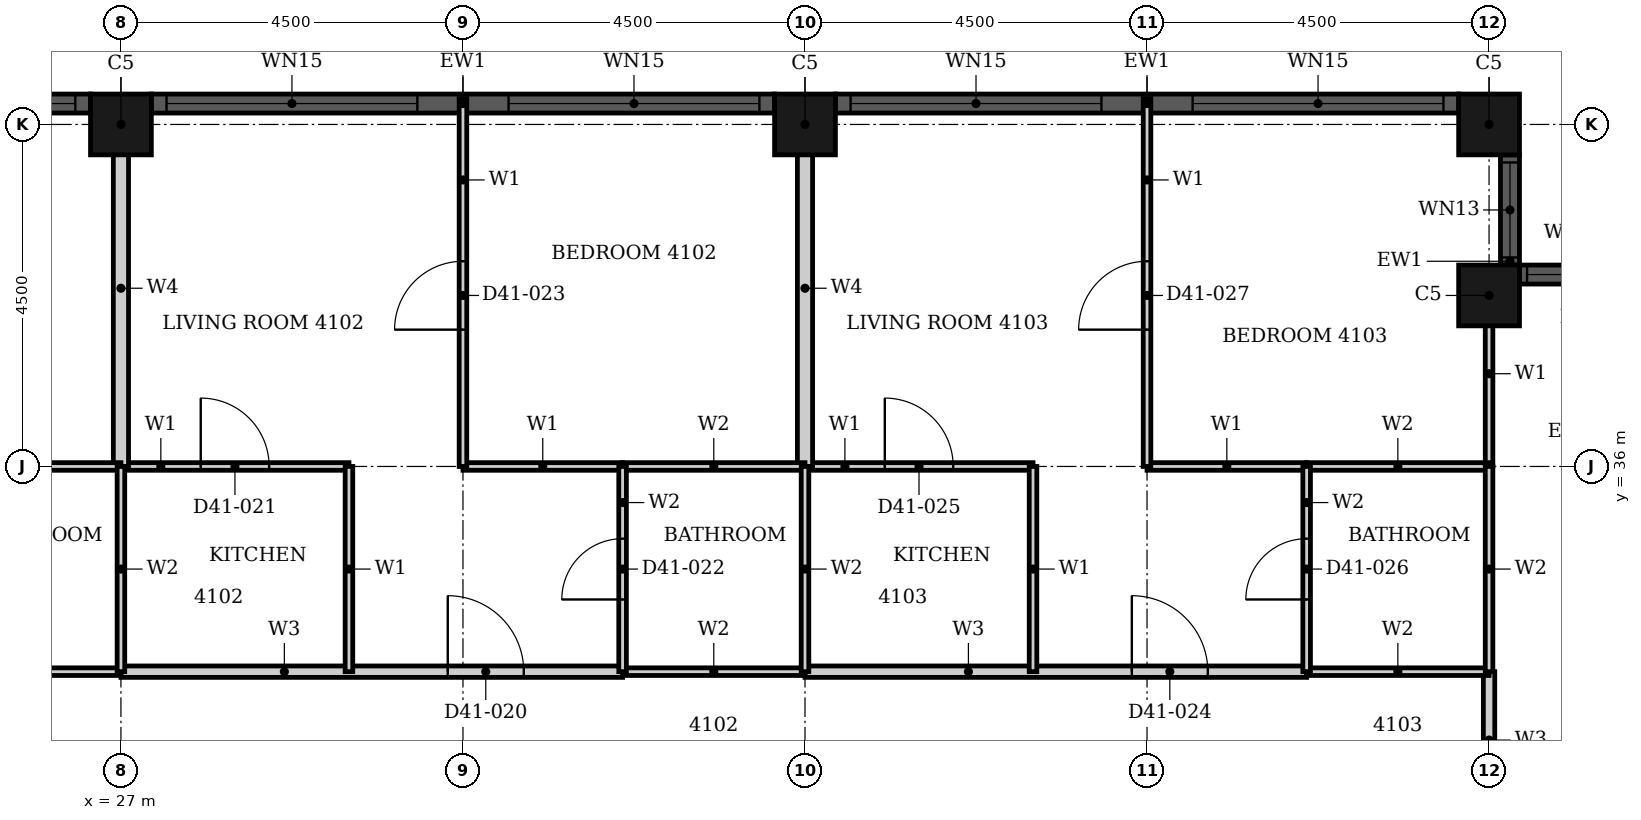
"""IFC4 building model, lengths in metres.
Left out: names, types, materials, properties, quantities, classifications, styles, units other than length and angle.
Written with IfcOpenShell. Run it as: python <this file> out.ifc"""

import sys

from ifc_helpers import new_model, si_unit, direction, frame, frame_2d, origin, origin_2d, place, context, subcontext, project, spatial, rectangle, hollow_rectangle, extrude, element, fill, save


model = new_model("IFC4")
c1 = context("Model", 3, precision=1e-05, world=origin(), true_north=direction((0.0, 1.0)))
c2 = subcontext(c1, "Body", "Model", "MODEL_VIEW")
j1 = project(units=[si_unit("LENGTHUNIT", "METRE"), si_unit("PLANEANGLEUNIT", "RADIAN")], contexts=[c1])
p1 = place(None, origin())
s1 = spatial("IfcSite", under=j1, at=p1, CompositionType="ELEMENT")
p2 = place(p1, origin())
s2 = spatial("IfcBuilding", under=s1, at=p2, CompositionType="ELEMENT")
p3 = place(p2, frame((0.0, 0.0, 165.4)))
s3 = spatial("IfcBuildingStorey", under=s2, at=p3, CompositionType="ELEMENT", Elevation=165.4)
for number, where, z_axis, x_axis in (
    (1, (45.0, 38.25, 0.0), (0.0, 0.0, 1.0), (1.0, 0.0, 0.0)),
    (2, (45.0, 40.5, 0.0), (0.0, 0.0, 1.0), (1.0, 0.0, 0.0)),
    (3, (36.0, 40.5, 0.0), (0.0, 0.0, 1.0), (1.0, 0.0, 0.0)),
    (4, (27.0, 40.5, 0.0), (0.0, 0.0, 1.0), (1.0, 0.0, 0.0)),
):
    element("IfcColumn", number, at=place(p3, frame(where, z_axis=z_axis, x_axis=x_axis)), inside=s3, PredefinedType="COLUMN", context=c2, shape_type="SweptSolid", body=[
        extrude(hollow_rectangle(XDim=0.8, YDim=0.8, WallThickness=0.025, at=origin_2d()), origin(), (0.0, 0.0, 1.0), 3.7),
    ])
p4 = place(p3, frame((46.85, 38.525, 0.0), z_axis=(0.0, 0.0, 1.0), x_axis=(-1.0, 0.0, 0.0)))
e5 = element("IfcWall", 5, at=p4, inside=s3, PredefinedType="SOLIDWALL", context=c2, shape_type="SweptSolid", body=[
    extrude(rectangle(XDim=1.45, YDim=0.25, at=frame_2d((0.725, 0.0))), origin(), (0.0, 0.0, 1.0), 3.7),
])
p5 = place(p4, frame((0.1, 0.0, 0.9)))
e6 = element("IfcOpeningElement", 6, at=p5, cuts=e5, PredefinedType="OPENING", context=c2, shape_type="SweptSolid", body=[
    extrude(rectangle(XDim=1.25, YDim=1.85, at=frame_2d((0.625, 0.925))), frame((0.0, 0.135, 0.0), z_axis=(0.0, -1.0, 0.0), x_axis=(1.0, 0.0, 0.0)), (0.0, 0.0, 1.0), 0.27),
])
p6 = place(p3, frame((45.275, 38.65, 0.0), z_axis=(0.0, 0.0, 1.0), x_axis=(0.0, 1.0, 0.0)))
e7 = element("IfcWall", 7, at=p6, inside=s3, PredefinedType="SOLIDWALL", context=c2, shape_type="SweptSolid", body=[
    extrude(rectangle(XDim=1.45, YDim=0.25, at=frame_2d((0.725, 0.0))), origin(), (0.0, 0.0, 1.0), 3.7),
])
p7 = place(p6, frame((0.1, 0.0, 0.9)))
e8 = element("IfcOpeningElement", 8, at=p7, cuts=e7, PredefinedType="OPENING", context=c2, shape_type="SweptSolid", body=[
    extrude(rectangle(XDim=1.25, YDim=1.85, at=frame_2d((0.625, 0.925))), frame((0.0, 0.135, 0.0), z_axis=(0.0, -1.0, 0.0), x_axis=(1.0, 0.0, 0.0)), (0.0, 0.0, 1.0), 0.27),
])
p8 = place(p3, frame((44.6, 40.775, 0.0), z_axis=(0.0, 0.0, 1.0), x_axis=(-1.0, 0.0, 0.0)))
e9 = element("IfcWall", 9, at=p8, inside=s3, PredefinedType="SOLIDWALL", context=c2, shape_type="SweptSolid", body=[
    extrude(rectangle(XDim=8.2, YDim=0.25, at=frame_2d((4.1, 0.0))), origin(), (0.0, 0.0, 1.0), 3.7),
])
p9 = place(p8, frame((0.2, 0.0, 0.45)))
e10 = element("IfcOpeningElement", 10, at=p9, cuts=e9, PredefinedType="OPENING", context=c2, shape_type="SweptSolid", body=[
    extrude(rectangle(XDim=3.3, YDim=2.3, at=frame_2d((1.65, 1.15))), frame((0.0, 0.135, 0.0), z_axis=(0.0, -1.0, 0.0), x_axis=(1.0, 0.0, 0.0)), (0.0, 0.0, 1.0), 0.27),
])
p10 = place(p8, frame((4.7, 0.0, 0.45)))
e11 = element("IfcOpeningElement", 11, at=p10, cuts=e9, PredefinedType="OPENING", context=c2, shape_type="SweptSolid", body=[
    extrude(rectangle(XDim=3.3, YDim=2.3, at=frame_2d((1.65, 1.15))), frame((0.0, 0.135, 0.0), z_axis=(0.0, -1.0, 0.0), x_axis=(1.0, 0.0, 0.0)), (0.0, 0.0, 1.0), 0.27),
])
p11 = place(p3, frame((35.6, 40.775, 0.0), z_axis=(0.0, 0.0, 1.0), x_axis=(-1.0, 0.0, 0.0)))
e12 = element("IfcWall", 12, at=p11, inside=s3, PredefinedType="SOLIDWALL", context=c2, shape_type="SweptSolid", body=[
    extrude(rectangle(XDim=8.2, YDim=0.25, at=frame_2d((4.1, 0.0))), origin(), (0.0, 0.0, 1.0), 3.7),
])
p12 = place(p11, frame((0.2, 0.0, 0.45)))
e13 = element("IfcOpeningElement", 13, at=p12, cuts=e12, PredefinedType="OPENING", context=c2, shape_type="SweptSolid", body=[
    extrude(rectangle(XDim=3.3, YDim=2.3, at=frame_2d((1.65, 1.15))), frame((0.0, 0.135, 0.0), z_axis=(0.0, -1.0, 0.0), x_axis=(1.0, 0.0, 0.0)), (0.0, 0.0, 1.0), 0.27),
])
p13 = place(p11, frame((4.7, 0.0, 0.45)))
e14 = element("IfcOpeningElement", 14, at=p13, cuts=e12, PredefinedType="OPENING", context=c2, shape_type="SweptSolid", body=[
    extrude(rectangle(XDim=3.3, YDim=2.3, at=frame_2d((1.65, 1.15))), frame((0.0, 0.135, 0.0), z_axis=(0.0, -1.0, 0.0), x_axis=(1.0, 0.0, 0.0)), (0.0, 0.0, 1.0), 0.27),
])
p14 = place(p3, frame((26.6, 40.775, 0.0), z_axis=(0.0, 0.0, 1.0), x_axis=(-1.0, 0.0, 0.0)))
e15 = element("IfcWall", 15, at=p14, inside=s3, PredefinedType="SOLIDWALL", context=c2, shape_type="SweptSolid", body=[
    extrude(rectangle(XDim=8.2, YDim=0.25, at=frame_2d((4.1, 0.0))), origin(), (0.0, 0.0, 1.0), 3.7),
])
p15 = place(p14, frame((0.2, 0.0, 0.45)))
e16 = element("IfcOpeningElement", 16, at=p15, cuts=e15, PredefinedType="OPENING", context=c2, shape_type="SweptSolid", body=[
    extrude(rectangle(XDim=3.3, YDim=2.3, at=frame_2d((1.65, 1.15))), frame((0.0, 0.135, 0.0), z_axis=(0.0, -1.0, 0.0), x_axis=(1.0, 0.0, 0.0)), (0.0, 0.0, 1.0), 0.27),
])
p16 = place(p14, frame((4.7, 0.0, 0.45)))
e17 = element("IfcOpeningElement", 17, at=p16, cuts=e15, PredefinedType="OPENING", context=c2, shape_type="SweptSolid", body=[
    extrude(rectangle(XDim=3.3, YDim=2.3, at=frame_2d((1.65, 1.15))), frame((0.0, 0.135, 0.0), z_axis=(0.0, -1.0, 0.0), x_axis=(1.0, 0.0, 0.0)), (0.0, 0.0, 1.0), 0.27),
])
p17 = place(p3, frame((27.0, 33.3, 0.0), z_axis=(0.0, 0.0, 1.0), x_axis=(1.0, 0.0, 0.0)))
e18 = element("IfcWall", 18, at=p17, inside=s3, PredefinedType="PARTITIONING", context=c2, shape_type="SweptSolid", body=[
    extrude(rectangle(XDim=6.6, YDim=0.15, at=frame_2d((3.3, 0.0))), origin(), (0.0, 0.0, 1.0), 3.4),
])
p18 = place(p17, frame((4.3, 0.0, 0.0)))
e19 = element("IfcOpeningElement", 19, at=p18, cuts=e18, PredefinedType="OPENING", context=c2, shape_type="SweptSolid", body=[
    extrude(rectangle(XDim=1.0, YDim=2.2, at=frame_2d((0.5, 1.1))), frame((0.0, 0.085, 0.0), z_axis=(0.0, -1.0, 0.0), x_axis=(1.0, 0.0, 0.0)), (0.0, 0.0, 1.0), 0.17),
])
p19 = place(p3, frame((36.0, 33.3, 0.0), z_axis=(0.0, 0.0, 1.0), x_axis=(1.0, 0.0, 0.0)))
e20 = element("IfcWall", 20, at=p19, inside=s3, PredefinedType="PARTITIONING", context=c2, shape_type="SweptSolid", body=[
    extrude(rectangle(XDim=6.6, YDim=0.15, at=frame_2d((3.3, 0.0))), origin(), (0.0, 0.0, 1.0), 3.4),
])
p20 = place(p19, frame((4.3, 0.0, 0.0)))
e21 = element("IfcOpeningElement", 21, at=p20, cuts=e20, PredefinedType="OPENING", context=c2, shape_type="SweptSolid", body=[
    extrude(rectangle(XDim=1.0, YDim=2.2, at=frame_2d((0.5, 1.1))), frame((0.0, 0.085, 0.0), z_axis=(0.0, -1.0, 0.0), x_axis=(1.0, 0.0, 0.0)), (0.0, 0.0, 1.0), 0.17),
])
p21 = place(p3, frame((45.0, 31.5, 0.0), z_axis=(0.0, 0.0, 1.0), x_axis=(0.0, 1.0, 0.0)))
e22 = element("IfcWall", 22, at=p21, inside=s3, PredefinedType="PARTITIONING", context=c2, shape_type="SweptSolid", body=[
    extrude(rectangle(XDim=1.8, YDim=0.15, at=frame_2d((0.9, 0.0))), origin(), (0.0, 0.0, 1.0), 3.4),
])
p22 = place(p3, frame((31.5, 36.0, 0.0), z_axis=(0.0, 0.0, 1.0), x_axis=(1.0, 0.0, 0.0)))
e23 = element("IfcWall", 23, at=p22, inside=s3, PredefinedType="PARTITIONING", context=c2, shape_type="SweptSolid", body=[
    extrude(rectangle(XDim=2.1, YDim=0.1, at=frame_2d((1.05, 0.0))), origin(), (0.0, 0.0, 1.0), 3.4),
])
p23 = place(p3, frame((27.0, 36.0, 0.0), z_axis=(0.0, 0.0, 1.0), x_axis=(1.0, 0.0, 0.0)))
e24 = element("IfcWall", 24, at=p23, inside=s3, PredefinedType="PARTITIONING", context=c2, shape_type="SweptSolid", body=[
    extrude(rectangle(XDim=3.0, YDim=0.1, at=frame_2d((1.5, 0.0))), origin(), (0.0, 0.0, 1.0), 3.4),
])
p24 = place(p23, frame((1.05, 0.0, 0.0)))
e25 = element("IfcOpeningElement", 25, at=p24, cuts=e24, PredefinedType="OPENING", context=c2, shape_type="SweptSolid", body=[
    extrude(rectangle(XDim=0.9, YDim=2.1, at=frame_2d((0.45, 1.05))), frame((0.0, 0.06, 0.0), z_axis=(0.0, -1.0, 0.0), x_axis=(1.0, 0.0, 0.0)), (0.0, 0.0, 1.0), 0.12),
])
p25 = place(p3, frame((40.5, 36.0, 0.0), z_axis=(0.0, 0.0, 1.0), x_axis=(1.0, 0.0, 0.0)))
e26 = element("IfcWall", 26, at=p25, inside=s3, PredefinedType="PARTITIONING", context=c2, shape_type="SweptSolid", body=[
    extrude(rectangle(XDim=2.1, YDim=0.1, at=frame_2d((1.05, 0.0))), origin(), (0.0, 0.0, 1.0), 3.4),
])
p26 = place(p3, frame((36.0, 36.0, 0.0), z_axis=(0.0, 0.0, 1.0), x_axis=(1.0, 0.0, 0.0)))
e27 = element("IfcWall", 27, at=p26, inside=s3, PredefinedType="PARTITIONING", context=c2, shape_type="SweptSolid", body=[
    extrude(rectangle(XDim=3.0, YDim=0.1, at=frame_2d((1.5, 0.0))), origin(), (0.0, 0.0, 1.0), 3.4),
])
p27 = place(p26, frame((1.05, 0.0, 0.0)))
e28 = element("IfcOpeningElement", 28, at=p27, cuts=e27, PredefinedType="OPENING", context=c2, shape_type="SweptSolid", body=[
    extrude(rectangle(XDim=0.9, YDim=2.1, at=frame_2d((0.45, 1.05))), frame((0.0, 0.06, 0.0), z_axis=(0.0, -1.0, 0.0), x_axis=(1.0, 0.0, 0.0)), (0.0, 0.0, 1.0), 0.12),
])
p28 = place(p3, frame((30.0, 33.3, 0.0), z_axis=(0.0, 0.0, 1.0), x_axis=(0.0, 1.0, 0.0)))
e29 = element("IfcWall", 29, at=p28, inside=s3, PredefinedType="PARTITIONING", context=c2, shape_type="SweptSolid", body=[
    extrude(rectangle(XDim=2.7, YDim=0.1, at=frame_2d((1.35, 0.0))), origin(), (0.0, 0.0, 1.0), 3.4),
])
p29 = place(p3, frame((31.5, 36.0, 0.0), z_axis=(0.0, 0.0, 1.0), x_axis=(0.0, 1.0, 0.0)))
e30 = element("IfcWall", 30, at=p29, inside=s3, PredefinedType="PARTITIONING", context=c2, shape_type="SweptSolid", body=[
    extrude(rectangle(XDim=4.84, YDim=0.1, at=frame_2d((2.42, 0.0))), origin(), (0.0, 0.0, 1.0), 3.4),
])
p30 = place(p29, frame((1.8, 0.0, 0.0)))
e31 = element("IfcOpeningElement", 31, at=p30, cuts=e30, PredefinedType="OPENING", context=c2, shape_type="SweptSolid", body=[
    extrude(rectangle(XDim=0.9, YDim=2.1, at=frame_2d((0.45, 1.05))), frame((0.0, 0.06, 0.0), z_axis=(0.0, -1.0, 0.0), x_axis=(1.0, 0.0, 0.0)), (0.0, 0.0, 1.0), 0.12),
])
p31 = place(p3, frame((39.0, 33.3, 0.0), z_axis=(0.0, 0.0, 1.0), x_axis=(0.0, 1.0, 0.0)))
e32 = element("IfcWall", 32, at=p31, inside=s3, PredefinedType="PARTITIONING", context=c2, shape_type="SweptSolid", body=[
    extrude(rectangle(XDim=2.7, YDim=0.1, at=frame_2d((1.35, 0.0))), origin(), (0.0, 0.0, 1.0), 3.4),
])
p32 = place(p3, frame((40.5, 36.0, 0.0), z_axis=(0.0, 0.0, 1.0), x_axis=(0.0, 1.0, 0.0)))
e33 = element("IfcWall", 33, at=p32, inside=s3, PredefinedType="PARTITIONING", context=c2, shape_type="SweptSolid", body=[
    extrude(rectangle(XDim=4.84, YDim=0.1, at=frame_2d((2.42, 0.0))), origin(), (0.0, 0.0, 1.0), 3.4),
])
p33 = place(p32, frame((1.8, 0.0, 0.0)))
e34 = element("IfcOpeningElement", 34, at=p33, cuts=e33, PredefinedType="OPENING", context=c2, shape_type="SweptSolid", body=[
    extrude(rectangle(XDim=0.9, YDim=2.1, at=frame_2d((0.45, 1.05))), frame((0.0, 0.06, 0.0), z_axis=(0.0, -1.0, 0.0), x_axis=(1.0, 0.0, 0.0)), (0.0, 0.0, 1.0), 0.12),
])
p34 = place(p3, frame((45.0, 36.001, 0.0), z_axis=(0.0, 0.0, 1.0), x_axis=(0.0, 1.0, 0.0)))
e35 = element("IfcWall", 35, at=p34, inside=s3, PredefinedType="PARTITIONING", context=c2, shape_type="SweptSolid", body=[
    extrude(rectangle(XDim=2.439, YDim=0.1, at=frame_2d((1.219, 0.0))), origin(), (0.0, 0.0, 1.0), 3.4),
])
for number, where, z_axis, x_axis in (
    (36, (27.0, 36.0, 0.0), (0.0, 0.0, 1.0), (0.0, 1.0, 0.0)),
    (37, (36.0, 36.0, 0.0), (0.0, 0.0, 1.0), (0.0, 1.0, 0.0)),
):
    element("IfcWall", number, at=place(p3, frame(where, z_axis=z_axis, x_axis=x_axis)), inside=s3, PredefinedType="PARTITIONING", context=c2, shape_type="SweptSolid", body=[
        extrude(rectangle(XDim=4.69, YDim=0.2, at=frame_2d((2.345, 0.0))), origin(), (0.0, 0.0, 1.0), 3.4),
    ])
for number, where, z_axis, x_axis in (
    (38, (24.6, 33.3, 0.0), (0.0, 0.0, 1.0), (1.0, 0.0, 0.0)),
    (39, (33.6, 33.3, 0.0), (0.0, 0.0, 1.0), (1.0, 0.0, 0.0)),
    (40, (42.6, 33.3, 0.0), (0.0, 0.0, 1.0), (1.0, 0.0, 0.0)),
    (41, (24.6, 36.0, 0.0), (0.0, 0.0, 1.0), (1.0, 0.0, 0.0)),
    (42, (33.6, 36.0, 0.0), (0.0, 0.0, 1.0), (1.0, 0.0, 0.0)),
    (43, (42.6, 36.0, 0.0), (0.0, 0.0, 1.0), (1.0, 0.0, 0.0)),
):
    element("IfcWall", number, at=place(p3, frame(where, z_axis=z_axis, x_axis=x_axis)), inside=s3, PredefinedType="PARTITIONING", context=c2, shape_type="SweptSolid", body=[
        extrude(rectangle(XDim=2.4, YDim=0.1, at=frame_2d((1.2, 0.0))), origin(), (0.0, 0.0, 1.0), 3.4),
    ])
p35 = place(p3, frame((27.0, 33.3, 0.0), z_axis=(0.0, 0.0, 1.0), x_axis=(0.0, 1.0, 0.0)))
e44 = element("IfcWall", 44, at=p35, inside=s3, PredefinedType="PARTITIONING", context=c2, shape_type="SweptSolid", body=[
    extrude(rectangle(XDim=2.7, YDim=0.1, at=frame_2d((1.35, 0.0))), origin(), (0.0, 0.0, 1.0), 3.4),
])
p36 = place(p3, frame((33.6, 33.3, 0.0), z_axis=(0.0, 0.0, 1.0), x_axis=(0.0, 1.0, 0.0)))
e45 = element("IfcWall", 45, at=p36, inside=s3, PredefinedType="PARTITIONING", context=c2, shape_type="SweptSolid", body=[
    extrude(rectangle(XDim=2.7, YDim=0.1, at=frame_2d((1.35, 0.0))), origin(), (0.0, 0.0, 1.0), 3.4),
])
p37 = place(p36, frame((0.95, 0.0, 0.0)))
e46 = element("IfcOpeningElement", 46, at=p37, cuts=e45, PredefinedType="OPENING", context=c2, shape_type="SweptSolid", body=[
    extrude(rectangle(XDim=0.8, YDim=2.1, at=frame_2d((0.4, 1.05))), frame((0.0, 0.06, 0.0), z_axis=(0.0, -1.0, 0.0), x_axis=(1.0, 0.0, 0.0)), (0.0, 0.0, 1.0), 0.12),
])
p38 = place(p3, frame((36.0, 33.3, 0.0), z_axis=(0.0, 0.0, 1.0), x_axis=(0.0, 1.0, 0.0)))
e47 = element("IfcWall", 47, at=p38, inside=s3, PredefinedType="PARTITIONING", context=c2, shape_type="SweptSolid", body=[
    extrude(rectangle(XDim=2.7, YDim=0.1, at=frame_2d((1.35, 0.0))), origin(), (0.0, 0.0, 1.0), 3.4),
])
p39 = place(p3, frame((42.6, 33.3, 0.0), z_axis=(0.0, 0.0, 1.0), x_axis=(0.0, 1.0, 0.0)))
e48 = element("IfcWall", 48, at=p39, inside=s3, PredefinedType="PARTITIONING", context=c2, shape_type="SweptSolid", body=[
    extrude(rectangle(XDim=2.7, YDim=0.1, at=frame_2d((1.35, 0.0))), origin(), (0.0, 0.0, 1.0), 3.4),
])
p40 = place(p39, frame((0.95, 0.0, 0.0)))
e49 = element("IfcOpeningElement", 49, at=p40, cuts=e48, PredefinedType="OPENING", context=c2, shape_type="SweptSolid", body=[
    extrude(rectangle(XDim=0.8, YDim=2.1, at=frame_2d((0.4, 1.05))), frame((0.0, 0.06, 0.0), z_axis=(0.0, -1.0, 0.0), x_axis=(1.0, 0.0, 0.0)), (0.0, 0.0, 1.0), 0.12),
])
p41 = place(p3, frame((45.0, 33.3, 0.0), z_axis=(0.0, 0.0, 1.0), x_axis=(0.0, 1.0, 0.0)))
e50 = element("IfcWall", 50, at=p41, inside=s3, PredefinedType="PARTITIONING", context=c2, shape_type="SweptSolid", body=[
    extrude(rectangle(XDim=2.7, YDim=0.1, at=frame_2d((1.35, 0.0))), origin(), (0.0, 0.0, 1.0), 3.4),
])
p42 = place(p5, origin())
e51 = element("IfcWindow", 51, at=p42, inside=s3, PartitioningType="SINGLE_PANEL", PredefinedType="WINDOW", context=c2, shape_type="SweptSolid", body=[
    extrude(rectangle(XDim=1.25, YDim=1.85, at=frame_2d((0.625, 0.925))), frame((0.0, 0.03, 0.0), z_axis=(0.0, -1.0, 0.0), x_axis=(1.0, 0.0, 0.0)), (0.0, 0.0, 1.0), 0.06),
])
fill(e6, e51)
p43 = place(p7, origin())
e52 = element("IfcWindow", 52, at=p43, inside=s3, PartitioningType="SINGLE_PANEL", PredefinedType="WINDOW", context=c2, shape_type="SweptSolid", body=[
    extrude(rectangle(XDim=1.25, YDim=1.85, at=frame_2d((0.625, 0.925))), frame((0.0, 0.03, 0.0), z_axis=(0.0, -1.0, 0.0), x_axis=(1.0, 0.0, 0.0)), (0.0, 0.0, 1.0), 0.06),
])
fill(e8, e52)
p44 = place(p9, origin())
e53 = element("IfcWindow", 53, at=p44, inside=s3, PartitioningType="SINGLE_PANEL", PredefinedType="WINDOW", context=c2, shape_type="SweptSolid", body=[
    extrude(rectangle(XDim=3.3, YDim=2.3, at=frame_2d((1.65, 1.15))), frame((0.0, 0.03, 0.0), z_axis=(0.0, -1.0, 0.0), x_axis=(1.0, 0.0, 0.0)), (0.0, 0.0, 1.0), 0.06),
])
fill(e10, e53)
p45 = place(p10, origin())
e54 = element("IfcWindow", 54, at=p45, inside=s3, PartitioningType="SINGLE_PANEL", PredefinedType="WINDOW", context=c2, shape_type="SweptSolid", body=[
    extrude(rectangle(XDim=3.3, YDim=2.3, at=frame_2d((1.65, 1.15))), frame((0.0, 0.03, 0.0), z_axis=(0.0, -1.0, 0.0), x_axis=(1.0, 0.0, 0.0)), (0.0, 0.0, 1.0), 0.06),
])
fill(e11, e54)
p46 = place(p12, origin())
e55 = element("IfcWindow", 55, at=p46, inside=s3, PartitioningType="SINGLE_PANEL", PredefinedType="WINDOW", context=c2, shape_type="SweptSolid", body=[
    extrude(rectangle(XDim=3.3, YDim=2.3, at=frame_2d((1.65, 1.15))), frame((0.0, 0.03, 0.0), z_axis=(0.0, -1.0, 0.0), x_axis=(1.0, 0.0, 0.0)), (0.0, 0.0, 1.0), 0.06),
])
fill(e13, e55)
p47 = place(p13, origin())
e56 = element("IfcWindow", 56, at=p47, inside=s3, PartitioningType="SINGLE_PANEL", PredefinedType="WINDOW", context=c2, shape_type="SweptSolid", body=[
    extrude(rectangle(XDim=3.3, YDim=2.3, at=frame_2d((1.65, 1.15))), frame((0.0, 0.03, 0.0), z_axis=(0.0, -1.0, 0.0), x_axis=(1.0, 0.0, 0.0)), (0.0, 0.0, 1.0), 0.06),
])
fill(e14, e56)
p48 = place(p15, origin())
e57 = element("IfcWindow", 57, at=p48, inside=s3, PartitioningType="SINGLE_PANEL", PredefinedType="WINDOW", context=c2, shape_type="SweptSolid", body=[
    extrude(rectangle(XDim=3.3, YDim=2.3, at=frame_2d((1.65, 1.15))), frame((0.0, 0.03, 0.0), z_axis=(0.0, -1.0, 0.0), x_axis=(1.0, 0.0, 0.0)), (0.0, 0.0, 1.0), 0.06),
])
fill(e16, e57)
p49 = place(p18, origin())
e58 = element("IfcDoor", 58, at=p49, inside=s3, OperationType="SINGLE_SWING_LEFT", PredefinedType="DOOR", context=c2, shape_type="SweptSolid", body=[
    extrude(rectangle(XDim=1.0, YDim=2.2, at=frame_2d((0.5, 1.1))), frame((0.0, 0.025, 0.0), z_axis=(0.0, -1.0, 0.0), x_axis=(1.0, 0.0, 0.0)), (0.0, 0.0, 1.0), 0.05),
])
fill(e19, e58)
p50 = place(p24, origin())
e59 = element("IfcDoor", 59, at=p50, inside=s3, OperationType="SINGLE_SWING_LEFT", PredefinedType="DOOR", context=c2, shape_type="SweptSolid", body=[
    extrude(rectangle(XDim=0.9, YDim=2.1, at=frame_2d((0.45, 1.05))), frame((0.0, 0.025, 0.0), z_axis=(0.0, -1.0, 0.0), x_axis=(1.0, 0.0, 0.0)), (0.0, 0.0, 1.0), 0.05),
])
fill(e25, e59)
p51 = place(p37, origin())
e60 = element("IfcDoor", 60, at=p51, inside=s3, OperationType="SINGLE_SWING_LEFT", PredefinedType="DOOR", context=c2, shape_type="SweptSolid", body=[
    extrude(rectangle(XDim=0.8, YDim=2.1, at=frame_2d((0.4, 1.05))), frame((0.0, 0.025, 0.0), z_axis=(0.0, -1.0, 0.0), x_axis=(1.0, 0.0, 0.0)), (0.0, 0.0, 1.0), 0.05),
])
fill(e46, e60)
p52 = place(p30, origin())
e61 = element("IfcDoor", 61, at=p52, inside=s3, OperationType="SINGLE_SWING_LEFT", PredefinedType="DOOR", context=c2, shape_type="SweptSolid", body=[
    extrude(rectangle(XDim=0.9, YDim=2.1, at=frame_2d((0.45, 1.05))), frame((0.0, 0.025, 0.0), z_axis=(0.0, -1.0, 0.0), x_axis=(1.0, 0.0, 0.0)), (0.0, 0.0, 1.0), 0.05),
])
fill(e31, e61)
p53 = place(p20, origin())
e62 = element("IfcDoor", 62, at=p53, inside=s3, OperationType="SINGLE_SWING_RIGHT", PredefinedType="DOOR", context=c2, shape_type="SweptSolid", body=[
    extrude(rectangle(XDim=1.0, YDim=2.2, at=frame_2d((0.5, 1.1))), frame((0.0, 0.025, 0.0), z_axis=(0.0, -1.0, 0.0), x_axis=(1.0, 0.0, 0.0)), (0.0, 0.0, 1.0), 0.05),
])
fill(e21, e62)
p54 = place(p27, origin())
e63 = element("IfcDoor", 63, at=p54, inside=s3, OperationType="SINGLE_SWING_LEFT", PredefinedType="DOOR", context=c2, shape_type="SweptSolid", body=[
    extrude(rectangle(XDim=0.9, YDim=2.1, at=frame_2d((0.45, 1.05))), frame((0.0, 0.025, 0.0), z_axis=(0.0, -1.0, 0.0), x_axis=(1.0, 0.0, 0.0)), (0.0, 0.0, 1.0), 0.05),
])
fill(e28, e63)
p55 = place(p40, origin())
e64 = element("IfcDoor", 64, at=p55, inside=s3, OperationType="SINGLE_SWING_RIGHT", PredefinedType="DOOR", context=c2, shape_type="SweptSolid", body=[
    extrude(rectangle(XDim=0.8, YDim=2.1, at=frame_2d((0.4, 1.05))), frame((0.0, 0.025, 0.0), z_axis=(0.0, -1.0, 0.0), x_axis=(1.0, 0.0, 0.0)), (0.0, 0.0, 1.0), 0.05),
])
fill(e49, e64)
p56 = place(p33, origin())
e65 = element("IfcDoor", 65, at=p56, inside=s3, OperationType="SINGLE_SWING_LEFT", PredefinedType="DOOR", context=c2, shape_type="SweptSolid", body=[
    extrude(rectangle(XDim=0.9, YDim=2.1, at=frame_2d((0.45, 1.05))), frame((0.0, 0.025, 0.0), z_axis=(0.0, -1.0, 0.0), x_axis=(1.0, 0.0, 0.0)), (0.0, 0.0, 1.0), 0.05),
])
fill(e34, e65)
save(model, sys.argv[1])
